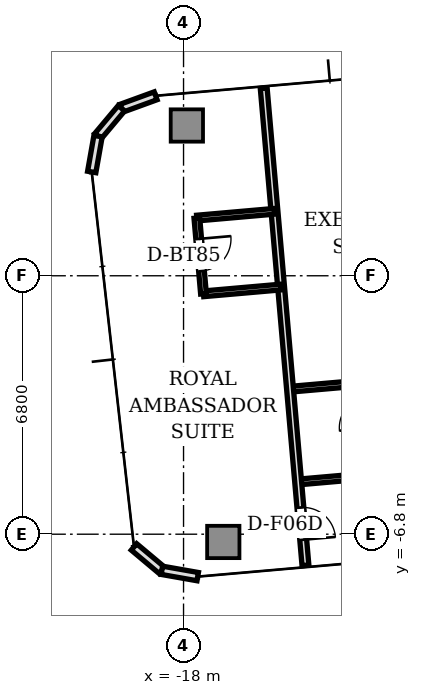
"""IFC4 building model, lengths in metres.
Left out: names, types, materials, properties, quantities, classifications, styles, units other than length and angle.
Written with IfcOpenShell. Run it as: python <this file> out.ifc"""

import sys

from ifc_helpers import new_model, si_unit, direction, frame, frame_2d, origin, origin_2d, place, context, subcontext, project, spatial, rectangle, extrude, source, transform, mapped, element, fill, save


model = new_model("IFC4")
c1 = context("Model", 3, precision=1e-05, world=origin(), true_north=direction((0.0, 1.0)))
c2 = subcontext(c1, "Body", "Model", "MODEL_VIEW")
j1 = project(units=[si_unit("LENGTHUNIT", "METRE"), si_unit("PLANEANGLEUNIT", "RADIAN")], contexts=[c1])
p1 = place(None, origin())
s1 = spatial("IfcSite", under=j1, at=p1, CompositionType="ELEMENT")
p2 = place(p1, origin())
s2 = spatial("IfcBuilding", under=s1, at=p2, CompositionType="ELEMENT")
p3 = place(p2, frame((0.0, 0.0, 195.3)))
s3 = spatial("IfcBuildingStorey", under=s2, at=p3, CompositionType="ELEMENT", Elevation=195.3)
m1 = source(origin(), c2, "Body", "SweptSolid", [
    extrude(rectangle(XDim=0.85, YDim=0.85, at=origin_2d()), origin(), (0.0, 0.0, 1.0), 3.11),
])
for number, where, z_axis, x_axis in (
    (1, (-17.913, 3.954, 0.0), (0.0, 0.0, 1.0), (1.0, 0.0, 0.0)),
    (2, (-16.954, -7.004, 0.0), (0.0, 0.0, 1.0), (1.0, 0.0, 0.0)),
):
    element("IfcColumn", number, at=place(p3, frame(where, z_axis=z_axis, x_axis=x_axis)), inside=s3, PredefinedType="COLUMN", context=c2, shape_type="MappedRepresentation", body=[
        mapped(m1, transform((0.0, 0.0, 0.0), scale=1.0)),
    ])
p4 = place(p3, frame((-18.734, 4.735, 0.0), z_axis=(0.0, 0.0, 1.0), x_axis=(-0.939741306239, -0.34188635151, 0.0)))
e3 = element("IfcWall", 3, at=p4, inside=s3, PredefinedType="STANDARD", context=c2, shape_type="SweptSolid", body=[
    extrude(rectangle(XDim=0.958, YDim=0.22, at=frame_2d((0.479, 0.0))), origin(), (0.0, 0.0, 1.0), 3.11),
])
for number, where, z_axis, x_axis in (
    (4, (-19.634, 4.408, 0.0), (0.0, 0.0, 1.0), (-0.643, -0.766, 0.0)),
    (5, (-20.25, 3.674, 0.0), (0.0, 0.0, 1.0), (-0.174, -0.985, 0.0)),
):
    element("IfcWall", number, at=place(p3, frame(where, z_axis=z_axis, x_axis=x_axis)), inside=s3, PredefinedType="STANDARD", context=c2, shape_type="SweptSolid", body=[
        extrude(rectangle(XDim=0.958, YDim=0.22, at=frame_2d((0.479, 0.0))), origin(), (0.0, 0.0, 1.0), 3.11),
    ])
p5 = place(p3, frame((-19.304, -7.135, 0.0), z_axis=(0.0, 0.0, 1.0), x_axis=(0.766001159887, -0.642839189107, 0.0)))
e6 = element("IfcWall", 6, at=p5, inside=s3, PredefinedType="STANDARD", context=c2, shape_type="SweptSolid", body=[
    extrude(rectangle(XDim=0.958, YDim=0.22, at=frame_2d((0.479, 0.0))), origin(), (0.0, 0.0, 1.0), 3.11),
])
p6 = place(p3, frame((-18.57, -7.75, 0.0), z_axis=(0.0, 0.0, 1.0), x_axis=(0.984770724397, -0.173858046606, 0.0)))
e7 = element("IfcWall", 7, at=p6, inside=s3, PredefinedType="STANDARD", context=c2, shape_type="SweptSolid", body=[
    extrude(rectangle(XDim=0.958, YDim=0.22, at=frame_2d((0.479, 0.0))), origin(), (0.0, 0.0, 1.0), 3.11),
])
p7 = place(p3, frame((-6.467, -4.681, 0.0), z_axis=(0.0, 0.0, 1.0), x_axis=(-0.996195452949, -0.087147114263, 0.0)))
e8 = element("IfcWall", 8, at=p7, inside=s3, PredefinedType="PARTITIONING", context=c2, shape_type="SweptSolid", body=[
    extrude(rectangle(XDim=8.55, YDim=0.15, at=frame_2d((4.275, 0.0))), origin(), (0.0, 0.0, 1.0), 2.66),
])
p8 = place(p7, frame((1.491, 0.0, 0.0)))
e9 = element("IfcOpeningElement", 9, at=p8, cuts=e8, PredefinedType="OPENING", context=c2, shape_type="SweptSolid", body=[
    extrude(rectangle(XDim=0.85, YDim=2.1, at=frame_2d((0.425, 1.05))), frame((0.0, 0.085, 0.0), z_axis=(0.0, -1.0, 0.0), x_axis=(1.0, 0.0, 0.0)), (0.0, 0.0, 1.0), 0.17),
])
p9 = place(p7, frame((4.792, 0.0, 0.0)))
e10 = element("IfcOpeningElement", 10, at=p9, cuts=e8, PredefinedType="OPENING", context=c2, shape_type="SweptSolid", body=[
    extrude(rectangle(XDim=0.85, YDim=2.1, at=frame_2d((0.425, 1.05))), frame((0.0, 0.085, 0.0), z_axis=(0.0, -1.0, 0.0), x_axis=(1.0, 0.0, 0.0)), (0.0, 0.0, 1.0), 0.17),
])
p10 = place(p3, frame((-13.156, -2.807, 0.0), z_axis=(0.0, 0.0, 1.0), x_axis=(-0.99620250363, -0.087066478976, 0.0)))
e11 = element("IfcWall", 11, at=p10, inside=s3, PredefinedType="PARTITIONING", context=c2, shape_type="SweptSolid", body=[
    extrude(rectangle(XDim=2.05, YDim=0.15, at=frame_2d((1.025, 0.0))), origin(), (0.0, 0.0, 1.0), 2.66),
])
p11 = place(p3, frame((-15.89, 4.934, 0.0), z_axis=(0.0, 0.0, 1.0), x_axis=(0.087154691724, -0.996194790044, 0.0)))
e12 = element("IfcWall", 12, at=p11, inside=s3, PredefinedType="PARTITIONING", context=c2, shape_type="SweptSolid", body=[
    extrude(rectangle(XDim=12.6, YDim=0.18, at=frame_2d((6.3, 0.0))), origin(), (0.0, 0.0, 1.0), 2.66),
])
p12 = place(p11, frame((11.075, 0.0, 0.0)))
e13 = element("IfcOpeningElement", 13, at=p12, cuts=e12, PredefinedType="OPENING", context=c2, shape_type="SweptSolid", body=[
    extrude(rectangle(XDim=0.85, YDim=2.1, at=frame_2d((0.425, 1.05))), frame((0.0, 0.1, 0.0), z_axis=(0.0, -1.0, 0.0), x_axis=(1.0, 0.0, 0.0)), (0.0, 0.0, 1.0), 0.2),
])
for number, where, z_axis, x_axis in (
    (14, (-15.433, -0.296, 0.0), (0.0, 0.0, 1.0), (-0.996, -0.087, 0.0)),
    (15, (-15.607, 1.696, 0.0), (0.0, 0.0, 1.0), (-0.996, -0.087, 0.0)),
):
    element("IfcWall", number, at=place(p3, frame(where, z_axis=z_axis, x_axis=x_axis)), inside=s3, PredefinedType="PARTITIONING", context=c2, shape_type="SweptSolid", body=[
        extrude(rectangle(XDim=2.05, YDim=0.15, at=frame_2d((1.025, 0.0))), origin(), (0.0, 0.0, 1.0), 2.66),
    ])
p13 = place(p3, frame((-17.649, 1.518, 0.0), z_axis=(0.0, 0.0, 1.0), x_axis=(0.087156350505, -0.99619464492, 0.0)))
e16 = element("IfcWall", 16, at=p13, inside=s3, PredefinedType="PARTITIONING", context=c2, shape_type="SweptSolid", body=[
    extrude(rectangle(XDim=2.0, YDim=0.15, at=frame_2d((1.0, 0.0))), origin(), (0.0, 0.0, 1.0), 2.63),
])
p14 = place(p13, frame((0.55, 0.0, 0.0)))
e17 = element("IfcOpeningElement", 17, at=p14, cuts=e16, PredefinedType="OPENING", context=c2, shape_type="SweptSolid", body=[
    extrude(rectangle(XDim=0.85, YDim=2.1, at=frame_2d((0.425, 1.05))), frame((0.0, 0.085, 0.0), z_axis=(0.0, -1.0, 0.0), x_axis=(1.0, 0.0, 0.0)), (0.0, 0.0, 1.0), 0.17),
])
m2 = source(origin(), c2, "Body", "SweptSolid", [
    extrude(rectangle(XDim=0.85, YDim=0.05, at=origin_2d()), origin(), (0.0, 0.0, 1.0), 2.1),
])
p15 = place(p14, frame((0.425, 0.0, 0.0)))
e18 = element("IfcDoor", 18, at=p15, inside=s3, OperationType="SINGLE_SWING_LEFT", PredefinedType="DOOR", context=c2, shape_type="MappedRepresentation", body=[
    mapped(m2, transform((0.0, 0.0, 0.0), scale=1.0)),
])
fill(e17, e18)
p16 = place(p12, frame((0.425, 0.0, 0.0)))
e19 = element("IfcDoor", 19, at=p16, inside=s3, OperationType="SINGLE_SWING_RIGHT", PredefinedType="DOOR", context=c2, shape_type="MappedRepresentation", body=[
    mapped(m2, transform((0.0, 0.0, 0.0), scale=1.0)),
])
fill(e13, e19)
save(model, sys.argv[1])
